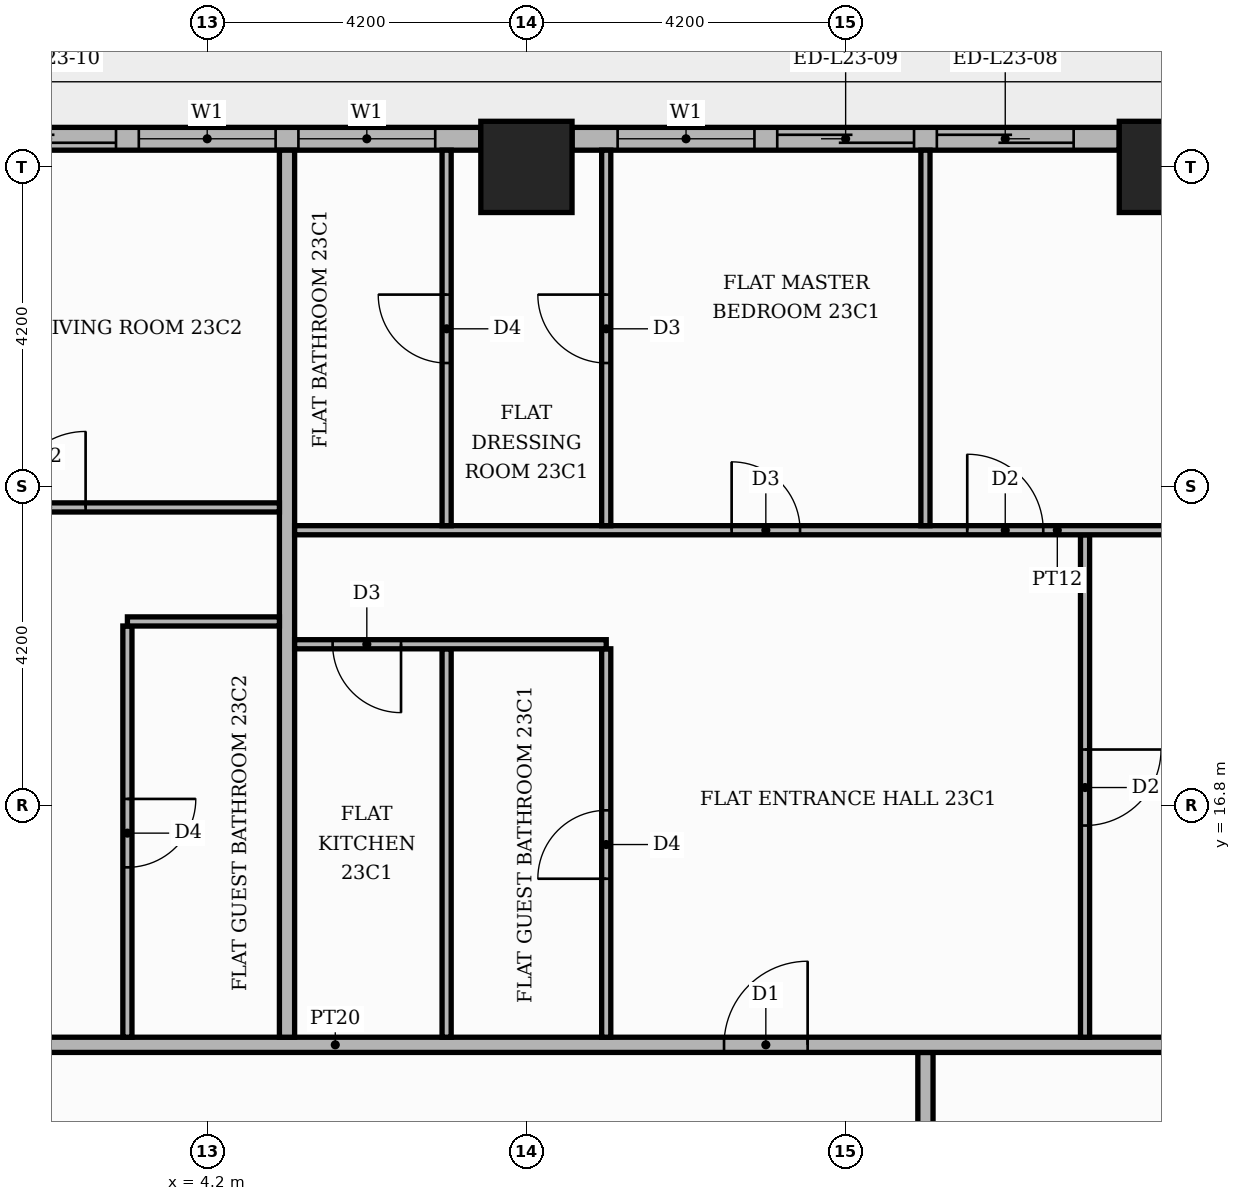
"""IFC4 building model, lengths in metres.
Left out: names, types, materials, properties, quantities, classifications, styles, units other than length and angle.
Written with IfcOpenShell. Run it as: python <this file> out.ifc"""

import sys

from ifc_helpers import new_model, si_unit, direction, frame, frame_2d, origin, origin_2d, place, context, subcontext, project, spatial, rectangle, extrude, element, fill, save


model = new_model("IFC4")
c1 = context("Model", 3, precision=1e-05, world=origin(), true_north=direction((0.0, 1.0)))
c2 = subcontext(c1, "Body", "Model", "MODEL_VIEW")
j1 = project(units=[si_unit("LENGTHUNIT", "METRE"), si_unit("PLANEANGLEUNIT", "RADIAN")], contexts=[c1])
p1 = place(None, origin())
s1 = spatial("IfcSite", under=j1, at=p1, CompositionType="ELEMENT")
p2 = place(p1, origin())
s2 = spatial("IfcBuilding", under=s1, at=p2, CompositionType="ELEMENT")
p3 = place(p2, frame((0.0, 0.0, 98.7)))
s3 = spatial("IfcBuildingStorey", under=s2, at=p3, CompositionType="ELEMENT", Elevation=98.7)
for number, where, z_axis, x_axis in (
    (1, (8.4, 25.2, 0.0), (0.0, 0.0, 1.0), (1.0, 0.0, 0.0)),
    (2, (16.8, 25.2, 0.0), (0.0, 0.0, 1.0), (1.0, 0.0, 0.0)),
):
    element("IfcColumn", number, at=place(p3, frame(where, z_axis=z_axis, x_axis=x_axis)), inside=s3, PredefinedType="COLUMN", context=c2, shape_type="SweptSolid", body=[
        extrude(rectangle(XDim=1.2, YDim=1.2, at=origin_2d()), origin(), (0.0, 0.0, 1.0), 3.9),
    ])
p4 = place(p3, frame((16.2, 25.57, 0.0), z_axis=(0.0, 0.0, 1.0), x_axis=(-1.0, 0.0, 0.0)))
e3 = element("IfcWall", 3, at=p4, inside=s3, PredefinedType="STANDARD", context=c2, shape_type="SweptSolid", body=[
    extrude(rectangle(XDim=7.2, YDim=0.3, at=frame_2d((3.6, 0.0))), origin(), (0.0, 0.0, 1.0), 3.48),
])
p5 = place(p4, frame((0.6, 0.0, 0.0)))
e4 = element("IfcOpeningElement", 4, at=p5, cuts=e3, PredefinedType="OPENING", context=c2, shape_type="SweptSolid", body=[
    extrude(rectangle(XDim=1.8, YDim=2.4, at=frame_2d((0.9, 1.2))), frame((0.0, 0.16, 0.0), z_axis=(0.0, -1.0, 0.0), x_axis=(1.0, 0.0, 0.0)), (0.0, 0.0, 1.0), 0.32),
])
p6 = place(p4, frame((2.7, 0.0, 0.0)))
e5 = element("IfcOpeningElement", 5, at=p6, cuts=e3, PredefinedType="OPENING", context=c2, shape_type="SweptSolid", body=[
    extrude(rectangle(XDim=1.8, YDim=2.4, at=frame_2d((0.9, 1.2))), frame((0.0, 0.16, 0.0), z_axis=(0.0, -1.0, 0.0), x_axis=(1.0, 0.0, 0.0)), (0.0, 0.0, 1.0), 0.32),
])
p7 = place(p4, frame((4.8, 0.0, 0.9)))
e6 = element("IfcOpeningElement", 6, at=p7, cuts=e3, PredefinedType="OPENING", context=c2, shape_type="SweptSolid", body=[
    extrude(rectangle(XDim=1.8, YDim=2.1, at=frame_2d((0.9, 1.05))), frame((0.0, 0.16, 0.0), z_axis=(0.0, -1.0, 0.0), x_axis=(1.0, 0.0, 0.0)), (0.0, 0.0, 1.0), 0.32),
])
p8 = place(p3, frame((7.8, 25.57, 0.0), z_axis=(0.0, 0.0, 1.0), x_axis=(-1.0, 0.0, 0.0)))
e7 = element("IfcWall", 7, at=p8, inside=s3, PredefinedType="STANDARD", context=c2, shape_type="SweptSolid", body=[
    extrude(rectangle(XDim=7.2, YDim=0.3, at=frame_2d((3.6, 0.0))), origin(), (0.0, 0.0, 1.0), 3.48),
])
p9 = place(p8, frame((0.6, 0.0, 0.9)))
e8 = element("IfcOpeningElement", 8, at=p9, cuts=e7, PredefinedType="OPENING", context=c2, shape_type="SweptSolid", body=[
    extrude(rectangle(XDim=1.8, YDim=2.1, at=frame_2d((0.9, 1.05))), frame((0.0, 0.16, 0.0), z_axis=(0.0, -1.0, 0.0), x_axis=(1.0, 0.0, 0.0)), (0.0, 0.0, 1.0), 0.32),
])
p10 = place(p8, frame((2.7, 0.0, 0.9)))
e9 = element("IfcOpeningElement", 9, at=p10, cuts=e7, PredefinedType="OPENING", context=c2, shape_type="SweptSolid", body=[
    extrude(rectangle(XDim=1.8, YDim=2.1, at=frame_2d((0.9, 1.05))), frame((0.0, 0.16, 0.0), z_axis=(0.0, -1.0, 0.0), x_axis=(1.0, 0.0, 0.0)), (0.0, 0.0, 1.0), 0.32),
])
p11 = place(p8, frame((4.8, 0.0, 0.0)))
e10 = element("IfcOpeningElement", 10, at=p11, cuts=e7, PredefinedType="OPENING", context=c2, shape_type="SweptSolid", body=[
    extrude(rectangle(XDim=1.8, YDim=2.4, at=frame_2d((0.9, 1.2))), frame((0.0, 0.16, 0.0), z_axis=(0.0, -1.0, 0.0), x_axis=(1.0, 0.0, 0.0)), (0.0, 0.0, 1.0), 0.32),
])
p12 = place(p3, frame((13.65, -5.15, 0.0), z_axis=(0.0, 0.0, 1.0), x_axis=(0.0, 1.0, 0.0)))
e11 = element("IfcWall", 11, at=p12, inside=s3, PredefinedType="PARTITIONING", context=c2, shape_type="SweptSolid", body=[
    extrude(rectangle(XDim=18.7, YDim=0.2, at=frame_2d((9.35, 0.0))), origin(), (0.0, 0.0, 1.0), 3.48),
])
p13 = place(p12, frame((1.45, 0.0, 0.0)))
e12 = element("IfcOpeningElement", 12, at=p13, cuts=e11, PredefinedType="OPENING", context=c2, shape_type="SweptSolid", body=[
    extrude(rectangle(XDim=1.1, YDim=2.4, at=frame_2d((0.55, 1.2))), frame((0.0, 0.11, 0.0), z_axis=(0.0, -1.0, 0.0), x_axis=(1.0, 0.0, 0.0)), (0.0, 0.0, 1.0), 0.22),
])
p14 = place(p3, frame((-13.65, 13.65, 0.0), z_axis=(0.0, 0.0, 1.0), x_axis=(1.0, 0.0, 0.0)))
e13 = element("IfcWall", 13, at=p14, inside=s3, PredefinedType="PARTITIONING", context=c2, shape_type="SweptSolid", body=[
    extrude(rectangle(XDim=39.07, YDim=0.2, at=frame_2d((19.535, 0.0))), origin(), (0.0, 0.0, 1.0), 3.48),
])
p15 = place(p14, frame((24.65, 0.0, 0.0)))
e14 = element("IfcOpeningElement", 14, at=p15, cuts=e13, PredefinedType="OPENING", context=c2, shape_type="SweptSolid", body=[
    extrude(rectangle(XDim=1.1, YDim=2.4, at=frame_2d((0.55, 1.2))), frame((0.0, 0.11, 0.0), z_axis=(0.0, -1.0, 0.0), x_axis=(1.0, 0.0, 0.0)), (0.0, 0.0, 1.0), 0.22),
])
p16 = place(p14, frame((14.15, 0.0, 0.0)))
e15 = element("IfcOpeningElement", 15, at=p16, cuts=e13, PredefinedType="OPENING", context=c2, shape_type="SweptSolid", body=[
    extrude(rectangle(XDim=1.1, YDim=2.4, at=frame_2d((0.55, 1.2))), frame((0.0, 0.11, 0.0), z_axis=(0.0, -1.0, 0.0), x_axis=(1.0, 0.0, 0.0)), (0.0, 0.0, 1.0), 0.22),
])
p17 = place(p3, frame((3.15, 13.75, 0.0), z_axis=(0.0, 0.0, 1.0), x_axis=(0.0, 1.0, 0.0)))
e16 = element("IfcWall", 16, at=p17, inside=s3, PredefinedType="PARTITIONING", context=c2, shape_type="SweptSolid", body=[
    extrude(rectangle(XDim=5.41, YDim=0.12, at=frame_2d((2.705, 0.0))), origin(), (0.0, 0.0, 1.0), 3.48),
])
p18 = place(p17, frame((2.235, 0.0, 0.0)))
e17 = element("IfcOpeningElement", 17, at=p18, cuts=e16, PredefinedType="OPENING", context=c2, shape_type="SweptSolid", body=[
    extrude(rectangle(XDim=0.9, YDim=2.1, at=frame_2d((0.45, 1.05))), frame((0.0, 0.07, 0.0), z_axis=(0.0, -1.0, 0.0), x_axis=(1.0, 0.0, 0.0)), (0.0, 0.0, 1.0), 0.14),
])
p19 = place(p3, frame((5.25, 13.75, 0.0), z_axis=(0.0, 0.0, 1.0), x_axis=(0.0, 1.0, 0.0)))
e18 = element("IfcWall", 18, at=p19, inside=s3, PredefinedType="PARTITIONING", context=c2, shape_type="SweptSolid", body=[
    extrude(rectangle(XDim=11.67, YDim=0.2, at=frame_2d((5.835, 0.0))), origin(), (0.0, 0.0, 1.0), 3.48),
])
p20 = place(p3, frame((7.35, 13.75, 0.0), z_axis=(0.0, 0.0, 1.0), x_axis=(0.0, 1.0, 0.0)))
e19 = element("IfcWall", 19, at=p20, inside=s3, PredefinedType="PARTITIONING", context=c2, shape_type="SweptSolid", body=[
    extrude(rectangle(XDim=5.11, YDim=0.12, at=frame_2d((2.555, 0.0))), origin(), (0.0, 0.0, 1.0), 3.48),
])
p21 = place(p3, frame((9.45, 13.75, 0.0), z_axis=(0.0, 0.0, 1.0), x_axis=(0.0, 1.0, 0.0)))
e20 = element("IfcWall", 20, at=p21, inside=s3, PredefinedType="PARTITIONING", context=c2, shape_type="SweptSolid", body=[
    extrude(rectangle(XDim=5.11, YDim=0.12, at=frame_2d((2.555, 0.0))), origin(), (0.0, 0.0, 1.0), 3.48),
])
p22 = place(p21, frame((2.085, 0.0, 0.0)))
e21 = element("IfcOpeningElement", 21, at=p22, cuts=e20, PredefinedType="OPENING", context=c2, shape_type="SweptSolid", body=[
    extrude(rectangle(XDim=0.9, YDim=2.1, at=frame_2d((0.45, 1.05))), frame((0.0, 0.07, 0.0), z_axis=(0.0, -1.0, 0.0), x_axis=(1.0, 0.0, 0.0)), (0.0, 0.0, 1.0), 0.14),
])
p23 = place(p3, frame((15.75, 13.75, 0.0), z_axis=(0.0, 0.0, 1.0), x_axis=(0.0, 1.0, 0.0)))
e22 = element("IfcWall", 22, at=p23, inside=s3, PredefinedType="PARTITIONING", context=c2, shape_type="SweptSolid", body=[
    extrude(rectangle(XDim=6.61, YDim=0.12, at=frame_2d((3.305, 0.0))), origin(), (0.0, 0.0, 1.0), 3.48),
])
p24 = place(p23, frame((2.785, 0.0, 0.0)))
e23 = element("IfcOpeningElement", 23, at=p24, cuts=e22, PredefinedType="OPENING", context=c2, shape_type="SweptSolid", body=[
    extrude(rectangle(XDim=1.0, YDim=2.1, at=frame_2d((0.5, 1.05))), frame((0.0, 0.07, 0.0), z_axis=(0.0, -1.0, 0.0), x_axis=(1.0, 0.0, 0.0)), (0.0, 0.0, 1.0), 0.14),
])
p25 = place(p3, frame((5.35, 18.92, 0.0), z_axis=(0.0, 0.0, 1.0), x_axis=(1.0, 0.0, 0.0)))
e24 = element("IfcWall", 24, at=p25, inside=s3, PredefinedType="PARTITIONING", context=c2, shape_type="SweptSolid", body=[
    extrude(rectangle(XDim=4.1, YDim=0.12, at=frame_2d((2.05, 0.0))), origin(), (0.0, 0.0, 1.0), 3.48),
])
p26 = place(p25, frame((0.5, 0.0, 0.0)))
e25 = element("IfcOpeningElement", 25, at=p26, cuts=e24, PredefinedType="OPENING", context=c2, shape_type="SweptSolid", body=[
    extrude(rectangle(XDim=0.9, YDim=2.1, at=frame_2d((0.45, 1.05))), frame((0.0, 0.07, 0.0), z_axis=(0.0, -1.0, 0.0), x_axis=(1.0, 0.0, 0.0)), (0.0, 0.0, 1.0), 0.14),
])
p27 = place(p3, frame((3.15, 19.22, 0.0), z_axis=(0.0, 0.0, 1.0), x_axis=(1.0, 0.0, 0.0)))
e26 = element("IfcWall", 26, at=p27, inside=s3, PredefinedType="PARTITIONING", context=c2, shape_type="SweptSolid", body=[
    extrude(rectangle(XDim=2.0, YDim=0.12, at=frame_2d((1.0, 0.0))), origin(), (0.0, 0.0, 1.0), 3.48),
])
p28 = place(p3, frame((5.35, 20.42, 0.0), z_axis=(0.0, 0.0, 1.0), x_axis=(1.0, 0.0, 0.0)))
e27 = element("IfcWall", 27, at=p28, inside=s3, PredefinedType="PARTITIONING", context=c2, shape_type="SweptSolid", body=[
    extrude(rectangle(XDim=20.07, YDim=0.12, at=frame_2d((10.035, 0.0))), origin(), (0.0, 0.0, 1.0), 3.48),
])
p29 = place(p28, frame((8.85, 0.0, 0.0)))
e28 = element("IfcOpeningElement", 28, at=p29, cuts=e27, PredefinedType="OPENING", context=c2, shape_type="SweptSolid", body=[
    extrude(rectangle(XDim=1.0, YDim=2.1, at=frame_2d((0.5, 1.05))), frame((0.0, 0.07, 0.0), z_axis=(0.0, -1.0, 0.0), x_axis=(1.0, 0.0, 0.0)), (0.0, 0.0, 1.0), 0.14),
])
p30 = place(p28, frame((5.75, 0.0, 0.0)))
e29 = element("IfcOpeningElement", 29, at=p30, cuts=e27, PredefinedType="OPENING", context=c2, shape_type="SweptSolid", body=[
    extrude(rectangle(XDim=0.9, YDim=2.1, at=frame_2d((0.45, 1.05))), frame((0.0, 0.07, 0.0), z_axis=(0.0, -1.0, 0.0), x_axis=(1.0, 0.0, 0.0)), (0.0, 0.0, 1.0), 0.14),
])
p31 = place(p3, frame((7.35, 20.48, 0.0), z_axis=(0.0, 0.0, 1.0), x_axis=(0.0, 1.0, 0.0)))
e30 = element("IfcWall", 30, at=p31, inside=s3, PredefinedType="PARTITIONING", context=c2, shape_type="SweptSolid", body=[
    extrude(rectangle(XDim=4.94, YDim=0.12, at=frame_2d((2.47, 0.0))), origin(), (0.0, 0.0, 1.0), 3.48),
])
p32 = place(p31, frame((2.14, 0.0, 0.0)))
e31 = element("IfcOpeningElement", 31, at=p32, cuts=e30, PredefinedType="OPENING", context=c2, shape_type="SweptSolid", body=[
    extrude(rectangle(XDim=0.9, YDim=2.1, at=frame_2d((0.45, 1.05))), frame((0.0, 0.07, 0.0), z_axis=(0.0, -1.0, 0.0), x_axis=(1.0, 0.0, 0.0)), (0.0, 0.0, 1.0), 0.14),
])
p33 = place(p3, frame((9.45, 20.48, 0.0), z_axis=(0.0, 0.0, 1.0), x_axis=(0.0, 1.0, 0.0)))
e32 = element("IfcWall", 32, at=p33, inside=s3, PredefinedType="PARTITIONING", context=c2, shape_type="SweptSolid", body=[
    extrude(rectangle(XDim=4.94, YDim=0.12, at=frame_2d((2.47, 0.0))), origin(), (0.0, 0.0, 1.0), 3.48),
])
p34 = place(p33, frame((2.14, 0.0, 0.0)))
e33 = element("IfcOpeningElement", 33, at=p34, cuts=e32, PredefinedType="OPENING", context=c2, shape_type="SweptSolid", body=[
    extrude(rectangle(XDim=0.9, YDim=2.1, at=frame_2d((0.45, 1.05))), frame((0.0, 0.07, 0.0), z_axis=(0.0, -1.0, 0.0), x_axis=(1.0, 0.0, 0.0)), (0.0, 0.0, 1.0), 0.14),
])
p35 = place(p3, frame((13.65, 20.48, 0.0), z_axis=(0.0, 0.0, 1.0), x_axis=(0.0, 1.0, 0.0)))
e34 = element("IfcWall", 34, at=p35, inside=s3, PredefinedType="PARTITIONING", context=c2, shape_type="SweptSolid", body=[
    extrude(rectangle(XDim=4.94, YDim=0.12, at=frame_2d((2.47, 0.0))), origin(), (0.0, 0.0, 1.0), 3.48),
])
p36 = place(p3, frame((-13.55, 20.72, 0.0), z_axis=(0.0, 0.0, 1.0), x_axis=(1.0, 0.0, 0.0)))
e35 = element("IfcWall", 35, at=p36, inside=s3, PredefinedType="PARTITIONING", context=c2, shape_type="SweptSolid", body=[
    extrude(rectangle(XDim=18.7, YDim=0.12, at=frame_2d((9.35, 0.0))), origin(), (0.0, 0.0, 1.0), 3.48),
])
p37 = place(p36, frame((15.15, 0.0, 0.0)))
e36 = element("IfcOpeningElement", 36, at=p37, cuts=e35, PredefinedType="OPENING", context=c2, shape_type="SweptSolid", body=[
    extrude(rectangle(XDim=1.0, YDim=2.1, at=frame_2d((0.5, 1.05))), frame((0.0, 0.07, 0.0), z_axis=(0.0, -1.0, 0.0), x_axis=(1.0, 0.0, 0.0)), (0.0, 0.0, 1.0), 0.14),
])
p38 = place(p36, frame((9.95, 0.0, 0.0)))
e37 = element("IfcOpeningElement", 37, at=p38, cuts=e35, PredefinedType="OPENING", context=c2, shape_type="SweptSolid", body=[
    extrude(rectangle(XDim=0.9, YDim=2.1, at=frame_2d((0.45, 1.05))), frame((0.0, 0.07, 0.0), z_axis=(0.0, -1.0, 0.0), x_axis=(1.0, 0.0, 0.0)), (0.0, 0.0, 1.0), 0.14),
])
p39 = place(p36, frame((1.55, 0.0, 0.0)))
e38 = element("IfcOpeningElement", 38, at=p39, cuts=e35, PredefinedType="OPENING", context=c2, shape_type="SweptSolid", body=[
    extrude(rectangle(XDim=0.9, YDim=2.1, at=frame_2d((0.45, 1.05))), frame((0.0, 0.07, 0.0), z_axis=(0.0, -1.0, 0.0), x_axis=(1.0, 0.0, 0.0)), (0.0, 0.0, 1.0), 0.14),
])
p40 = place(p5, origin())
e39 = element("IfcDoor", 39, at=p40, inside=s3, OperationType="SLIDING_TO_LEFT", PredefinedType="DOOR", context=c2, shape_type="SweptSolid", body=[
    extrude(rectangle(XDim=1.8, YDim=2.4, at=frame_2d((0.9, 1.2))), frame((0.0, 0.025, 0.0), z_axis=(0.0, -1.0, 0.0), x_axis=(1.0, 0.0, 0.0)), (0.0, 0.0, 1.0), 0.05),
])
fill(e4, e39)
p41 = place(p6, origin())
e40 = element("IfcDoor", 40, at=p41, inside=s3, OperationType="SLIDING_TO_RIGHT", PredefinedType="DOOR", context=c2, shape_type="SweptSolid", body=[
    extrude(rectangle(XDim=1.8, YDim=2.4, at=frame_2d((0.9, 1.2))), frame((0.0, 0.025, 0.0), z_axis=(0.0, -1.0, 0.0), x_axis=(1.0, 0.0, 0.0)), (0.0, 0.0, 1.0), 0.05),
])
fill(e5, e40)
p42 = place(p7, origin())
e41 = element("IfcWindow", 41, at=p42, inside=s3, PartitioningType="SINGLE_PANEL", PredefinedType="WINDOW", context=c2, shape_type="SweptSolid", body=[
    extrude(rectangle(XDim=1.8, YDim=2.1, at=frame_2d((0.9, 1.05))), frame((0.0, 0.03, 0.0), z_axis=(0.0, -1.0, 0.0), x_axis=(1.0, 0.0, 0.0)), (0.0, 0.0, 1.0), 0.06),
])
fill(e6, e41)
p43 = place(p9, origin())
e42 = element("IfcWindow", 42, at=p43, inside=s3, PartitioningType="SINGLE_PANEL", PredefinedType="WINDOW", context=c2, shape_type="SweptSolid", body=[
    extrude(rectangle(XDim=1.8, YDim=2.1, at=frame_2d((0.9, 1.05))), frame((0.0, 0.03, 0.0), z_axis=(0.0, -1.0, 0.0), x_axis=(1.0, 0.0, 0.0)), (0.0, 0.0, 1.0), 0.06),
])
fill(e8, e42)
p44 = place(p10, origin())
e43 = element("IfcWindow", 43, at=p44, inside=s3, PartitioningType="SINGLE_PANEL", PredefinedType="WINDOW", context=c2, shape_type="SweptSolid", body=[
    extrude(rectangle(XDim=1.8, YDim=2.1, at=frame_2d((0.9, 1.05))), frame((0.0, 0.03, 0.0), z_axis=(0.0, -1.0, 0.0), x_axis=(1.0, 0.0, 0.0)), (0.0, 0.0, 1.0), 0.06),
])
fill(e9, e43)
p45 = place(p11, origin())
e44 = element("IfcDoor", 44, at=p45, inside=s3, OperationType="SLIDING_TO_RIGHT", PredefinedType="DOOR", context=c2, shape_type="SweptSolid", body=[
    extrude(rectangle(XDim=1.8, YDim=2.4, at=frame_2d((0.9, 1.2))), frame((0.0, 0.025, 0.0), z_axis=(0.0, -1.0, 0.0), x_axis=(1.0, 0.0, 0.0)), (0.0, 0.0, 1.0), 0.05),
])
fill(e10, e44)
p46 = place(p15, origin())
e45 = element("IfcDoor", 45, at=p46, inside=s3, OperationType="SINGLE_SWING_RIGHT", PredefinedType="DOOR", context=c2, shape_type="SweptSolid", body=[
    extrude(rectangle(XDim=1.1, YDim=2.4, at=frame_2d((0.55, 1.2))), frame((0.0, 0.025, 0.0), z_axis=(0.0, -1.0, 0.0), x_axis=(1.0, 0.0, 0.0)), (0.0, 0.0, 1.0), 0.05),
])
fill(e14, e45)
p47 = place(p24, frame((1.0, 0.0, 0.0), z_axis=(0.0, 0.0, 1.0), x_axis=(-1.0, 0.0, 0.0)))
e46 = element("IfcDoor", 46, at=p47, inside=s3, OperationType="SINGLE_SWING_RIGHT", PredefinedType="DOOR", context=c2, shape_type="SweptSolid", body=[
    extrude(rectangle(XDim=1.0, YDim=2.1, at=frame_2d((0.5, 1.05))), frame((0.0, 0.025, 0.0), z_axis=(0.0, -1.0, 0.0), x_axis=(1.0, 0.0, 0.0)), (0.0, 0.0, 1.0), 0.05),
])
fill(e23, e46)
p48 = place(p22, origin())
e47 = element("IfcDoor", 47, at=p48, inside=s3, OperationType="SINGLE_SWING_LEFT", PredefinedType="DOOR", context=c2, shape_type="SweptSolid", body=[
    extrude(rectangle(XDim=0.9, YDim=2.1, at=frame_2d((0.45, 1.05))), frame((0.0, 0.025, 0.0), z_axis=(0.0, -1.0, 0.0), x_axis=(1.0, 0.0, 0.0)), (0.0, 0.0, 1.0), 0.05),
])
fill(e21, e47)
p49 = place(p26, frame((0.9, 0.0, 0.0), z_axis=(0.0, 0.0, 1.0), x_axis=(-1.0, 0.0, 0.0)))
e48 = element("IfcDoor", 48, at=p49, inside=s3, OperationType="SINGLE_SWING_RIGHT", PredefinedType="DOOR", context=c2, shape_type="SweptSolid", body=[
    extrude(rectangle(XDim=0.9, YDim=2.1, at=frame_2d((0.45, 1.05))), frame((0.0, 0.025, 0.0), z_axis=(0.0, -1.0, 0.0), x_axis=(1.0, 0.0, 0.0)), (0.0, 0.0, 1.0), 0.05),
])
fill(e25, e48)
p50 = place(p29, origin())
e49 = element("IfcDoor", 49, at=p50, inside=s3, OperationType="SINGLE_SWING_LEFT", PredefinedType="DOOR", context=c2, shape_type="SweptSolid", body=[
    extrude(rectangle(XDim=1.0, YDim=2.1, at=frame_2d((0.5, 1.05))), frame((0.0, 0.025, 0.0), z_axis=(0.0, -1.0, 0.0), x_axis=(1.0, 0.0, 0.0)), (0.0, 0.0, 1.0), 0.05),
])
fill(e28, e49)
p51 = place(p30, origin())
e50 = element("IfcDoor", 50, at=p51, inside=s3, OperationType="SINGLE_SWING_LEFT", PredefinedType="DOOR", context=c2, shape_type="SweptSolid", body=[
    extrude(rectangle(XDim=0.9, YDim=2.1, at=frame_2d((0.45, 1.05))), frame((0.0, 0.025, 0.0), z_axis=(0.0, -1.0, 0.0), x_axis=(1.0, 0.0, 0.0)), (0.0, 0.0, 1.0), 0.05),
])
fill(e29, e50)
p52 = place(p34, origin())
e51 = element("IfcDoor", 51, at=p52, inside=s3, OperationType="SINGLE_SWING_RIGHT", PredefinedType="DOOR", context=c2, shape_type="SweptSolid", body=[
    extrude(rectangle(XDim=0.9, YDim=2.1, at=frame_2d((0.45, 1.05))), frame((0.0, 0.025, 0.0), z_axis=(0.0, -1.0, 0.0), x_axis=(1.0, 0.0, 0.0)), (0.0, 0.0, 1.0), 0.05),
])
fill(e33, e51)
p53 = place(p32, origin())
e52 = element("IfcDoor", 52, at=p53, inside=s3, OperationType="SINGLE_SWING_RIGHT", PredefinedType="DOOR", context=c2, shape_type="SweptSolid", body=[
    extrude(rectangle(XDim=0.9, YDim=2.1, at=frame_2d((0.45, 1.05))), frame((0.0, 0.025, 0.0), z_axis=(0.0, -1.0, 0.0), x_axis=(1.0, 0.0, 0.0)), (0.0, 0.0, 1.0), 0.05),
])
fill(e31, e52)
p54 = place(p18, frame((0.9, 0.0, 0.0), z_axis=(0.0, 0.0, 1.0), x_axis=(-1.0, 0.0, 0.0)))
e53 = element("IfcDoor", 53, at=p54, inside=s3, OperationType="SINGLE_SWING_RIGHT", PredefinedType="DOOR", context=c2, shape_type="SweptSolid", body=[
    extrude(rectangle(XDim=0.9, YDim=2.1, at=frame_2d((0.45, 1.05))), frame((0.0, 0.025, 0.0), z_axis=(0.0, -1.0, 0.0), x_axis=(1.0, 0.0, 0.0)), (0.0, 0.0, 1.0), 0.05),
])
fill(e17, e53)
p55 = place(p37, origin())
e54 = element("IfcDoor", 54, at=p55, inside=s3, OperationType="SINGLE_SWING_RIGHT", PredefinedType="DOOR", context=c2, shape_type="SweptSolid", body=[
    extrude(rectangle(XDim=1.0, YDim=2.1, at=frame_2d((0.5, 1.05))), frame((0.0, 0.025, 0.0), z_axis=(0.0, -1.0, 0.0), x_axis=(1.0, 0.0, 0.0)), (0.0, 0.0, 1.0), 0.05),
])
fill(e36, e54)
save(model, sys.argv[1])
